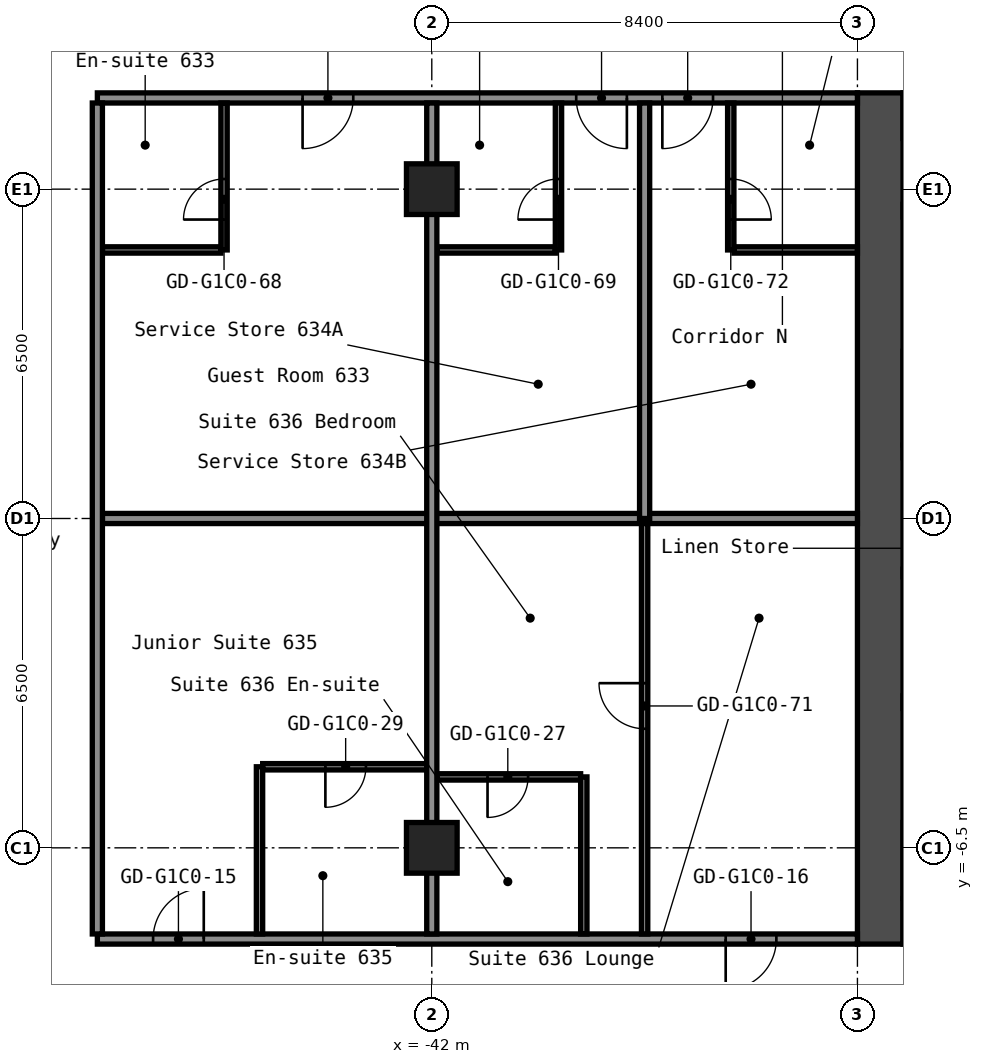
"""IFC4 building model, lengths in metres.
Left out: names, types, materials, properties, quantities, classifications, styles, units other than length and angle.
Written with IfcOpenShell. Run it as: python <this file> out.ifc"""

import sys

from ifc_helpers import new_model, si_unit, direction, frame, frame_2d, origin, origin_2d, place, context, subcontext, project, spatial, rectangle, hollow_rectangle, extrude, element, fill, save


model = new_model("IFC4")
c1 = context("Model", 3, precision=1e-05, world=origin(), true_north=direction((0.0, 1.0)))
c2 = subcontext(c1, "Body", "Model", "MODEL_VIEW")
j1 = project(units=[si_unit("LENGTHUNIT", "METRE"), si_unit("PLANEANGLEUNIT", "RADIAN")], contexts=[c1])
p1 = place(None, origin())
s1 = spatial("IfcSite", under=j1, at=p1, CompositionType="ELEMENT")
p2 = place(p1, origin())
s2 = spatial("IfcBuilding", under=s1, at=p2, CompositionType="ELEMENT")
p3 = place(p2, frame((0.0, 0.0, 26.2)))
s3 = spatial("IfcBuildingStorey", under=s2, at=p3, CompositionType="ELEMENT", Elevation=26.2)
for number, where, z_axis, x_axis in (
    (1, (-42.0, -6.5, 0.0), (0.0, 0.0, 1.0), (1.0, 0.0, 0.0)),
    (2, (-42.0, 6.5, 0.0), (0.0, 0.0, 1.0), (1.0, 0.0, 0.0)),
):
    element("IfcColumn", number, at=place(p3, frame(where, z_axis=z_axis, x_axis=x_axis)), inside=s3, PredefinedType="COLUMN", context=c2, shape_type="SweptSolid", body=[
        extrude(hollow_rectangle(XDim=1.0, YDim=1.0, WallThickness=0.04, at=origin_2d()), origin(), (0.0, 0.0, 1.0), 2.8),
    ])
p4 = place(p3, frame((-33.15, -8.4, 0.0), z_axis=(0.0, 0.0, 1.0), x_axis=(0.0, 1.0, 0.0)))
e3 = element("IfcWall", 3, at=p4, inside=s3, PredefinedType="SHEAR", context=c2, shape_type="SweptSolid", body=[
    extrude(rectangle(XDim=16.8, YDim=0.9, at=frame_2d((8.4, 0.0))), origin(), (0.0, 0.0, 1.0), 2.8),
])
p5 = place(p3, frame((-32.7, 1.325, 0.0), z_axis=(0.0, 0.0, 1.0), x_axis=(1.0, 0.0, 0.0)))
e4 = element("IfcWall", 4, at=p5, inside=s3, PredefinedType="SHEAR", context=c2, shape_type="SweptSolid", body=[
    extrude(rectangle(XDim=5.05, YDim=0.25, at=frame_2d((2.525, 0.0))), origin(), (0.0, 0.0, 1.0), 2.8),
])
p6 = place(p5, frame((3.3, 0.0, 0.0)))
e5 = element("IfcOpeningElement", 5, at=p6, cuts=e4, PredefinedType="OPENING", context=c2, shape_type="SweptSolid", body=[
    extrude(rectangle(XDim=1.2, YDim=2.1, at=frame_2d((0.6, 1.05))), frame((0.0, 0.135, 0.0), z_axis=(0.0, -1.0, 0.0), x_axis=(1.0, 0.0, 0.0)), (0.0, 0.0, 1.0), 0.27),
])
p7 = place(p3, frame((-32.7, -3.625, 0.0), z_axis=(0.0, 0.0, 1.0), x_axis=(1.0, 0.0, 0.0)))
e6 = element("IfcWall", 6, at=p7, inside=s3, PredefinedType="SHEAR", context=c2, shape_type="SweptSolid", body=[
    extrude(rectangle(XDim=4.55, YDim=0.25, at=frame_2d((2.275, 0.0))), origin(), (0.0, 0.0, 1.0), 2.8),
])
p8 = place(p7, frame((2.85, 0.0, 0.0)))
e7 = element("IfcOpeningElement", 7, at=p8, cuts=e6, PredefinedType="OPENING", context=c2, shape_type="SweptSolid", body=[
    extrude(rectangle(XDim=1.1, YDim=2.1, at=frame_2d((0.55, 1.05))), frame((0.0, 0.135, 0.0), z_axis=(0.0, -1.0, 0.0), x_axis=(1.0, 0.0, 0.0)), (0.0, 0.0, 1.0), 0.27),
])
p9 = place(p7, frame((0.6, 0.0, 0.0)))
e8 = element("IfcOpeningElement", 8, at=p9, cuts=e6, PredefinedType="OPENING", context=c2, shape_type="SweptSolid", body=[
    extrude(rectangle(XDim=1.1, YDim=2.1, at=frame_2d((0.55, 1.05))), frame((0.0, 0.135, 0.0), z_axis=(0.0, -1.0, 0.0), x_axis=(1.0, 0.0, 0.0)), (0.0, 0.0, 1.0), 0.27),
])
p10 = place(p3, frame((-32.7, -6.75, 0.0), z_axis=(0.0, 0.0, 1.0), x_axis=(1.0, 0.0, 0.0)))
e9 = element("IfcWall", 9, at=p10, inside=s3, PredefinedType="SHEAR", context=c2, shape_type="SweptSolid", body=[
    extrude(rectangle(XDim=4.55, YDim=1.5, at=frame_2d((2.275, 0.0))), origin(), (0.0, 0.0, 1.0), 2.8),
])
p11 = place(p3, frame((-32.7, -1.075, 0.0), z_axis=(0.0, 0.0, 1.0), x_axis=(1.0, 0.0, 0.0)))
e10 = element("IfcWall", 10, at=p11, inside=s3, PredefinedType="PARTITIONING", context=c2, shape_type="SweptSolid", body=[
    extrude(rectangle(XDim=1.6, YDim=0.15, at=frame_2d((0.8, 0.0))), origin(), (0.0, 0.0, 1.0), 2.8),
])
p12 = place(p3, frame((-48.6, -8.3, 0.0), z_axis=(0.0, 0.0, 1.0), x_axis=(1.0, 0.0, 0.0)))
e11 = element("IfcWall", 11, at=p12, inside=s3, PredefinedType="PARTITIONING", context=c2, shape_type="SweptSolid", body=[
    extrude(rectangle(XDim=15.0, YDim=0.2, at=frame_2d((7.5, 0.0))), origin(), (0.0, 0.0, 1.0), 2.8),
])
p13 = place(p12, frame((1.1, 0.0, 0.0)))
e12 = element("IfcOpeningElement", 12, at=p13, cuts=e11, PredefinedType="OPENING", context=c2, shape_type="SweptSolid", body=[
    extrude(rectangle(XDim=1.0, YDim=2.1, at=frame_2d((0.5, 1.05))), frame((0.0, 0.11, 0.0), z_axis=(0.0, -1.0, 0.0), x_axis=(1.0, 0.0, 0.0)), (0.0, 0.0, 1.0), 0.22),
])
p14 = place(p12, frame((12.4, 0.0, 0.0)))
e13 = element("IfcOpeningElement", 13, at=p14, cuts=e11, PredefinedType="OPENING", context=c2, shape_type="SweptSolid", body=[
    extrude(rectangle(XDim=1.0, YDim=2.1, at=frame_2d((0.5, 1.05))), frame((0.0, 0.11, 0.0), z_axis=(0.0, -1.0, 0.0), x_axis=(1.0, 0.0, 0.0)), (0.0, 0.0, 1.0), 0.22),
])
p15 = place(p3, frame((-41.9, -5.1, 0.0), z_axis=(0.0, 0.0, 1.0), x_axis=(1.0, 0.0, 0.0)))
e14 = element("IfcWall", 14, at=p15, inside=s3, PredefinedType="PARTITIONING", context=c2, shape_type="SweptSolid", body=[
    extrude(rectangle(XDim=2.837, YDim=0.125, at=frame_2d((1.419, 0.0))), origin(), (0.0, 0.0, 1.0), 2.8),
])
p16 = place(p15, frame((1.0, 0.0, 0.0)))
e15 = element("IfcOpeningElement", 15, at=p16, cuts=e14, PredefinedType="OPENING", context=c2, shape_type="SweptSolid", body=[
    extrude(rectangle(XDim=0.8, YDim=2.1, at=frame_2d((0.4, 1.05))), frame((0.0, 0.073, 0.0), z_axis=(0.0, -1.0, 0.0), x_axis=(1.0, 0.0, 0.0)), (0.0, 0.0, 1.0), 0.145),
])
p17 = place(p3, frame((-45.337, -4.9, 0.0), z_axis=(0.0, 0.0, 1.0), x_axis=(1.0, 0.0, 0.0)))
e16 = element("IfcWall", 16, at=p17, inside=s3, PredefinedType="PARTITIONING", context=c2, shape_type="SweptSolid", body=[
    extrude(rectangle(XDim=3.237, YDim=0.125, at=frame_2d((1.619, 0.0))), origin(), (0.0, 0.0, 1.0), 2.8),
])
p18 = place(p17, frame((1.238, 0.0, 0.0)))
e17 = element("IfcOpeningElement", 17, at=p18, cuts=e16, PredefinedType="OPENING", context=c2, shape_type="SweptSolid", body=[
    extrude(rectangle(XDim=0.8, YDim=2.1, at=frame_2d((0.4, 1.05))), frame((0.0, 0.073, 0.0), z_axis=(0.0, -1.0, 0.0), x_axis=(1.0, 0.0, 0.0)), (0.0, 0.0, 1.0), 0.145),
])
p19 = place(p3, frame((-48.5, 0.0, 0.0), z_axis=(0.0, 0.0, 1.0), x_axis=(1.0, 0.0, 0.0)))
e18 = element("IfcWall", 18, at=p19, inside=s3, PredefinedType="PARTITIONING", context=c2, shape_type="SweptSolid", body=[
    extrude(rectangle(XDim=14.9, YDim=0.2, at=frame_2d((7.45, 0.0))), origin(), (0.0, 0.0, 1.0), 2.8),
])
for number, where, z_axis, x_axis in (
    (19, (-48.5, 5.3, 0.0), (0.0, 0.0, 1.0), (1.0, 0.0, 0.0)),
    (20, (-41.9, 5.3, 0.0), (0.0, 0.0, 1.0), (1.0, 0.0, 0.0)),
):
    element("IfcWall", number, at=place(p3, frame(where, z_axis=z_axis, x_axis=x_axis)), inside=s3, PredefinedType="PARTITIONING", context=c2, shape_type="SweptSolid", body=[
        extrude(rectangle(XDim=2.337, YDim=0.125, at=frame_2d((1.169, 0.0))), origin(), (0.0, 0.0, 1.0), 2.8),
    ])
p20 = place(p3, frame((-36.038, 5.3, 0.0), z_axis=(0.0, 0.0, 1.0), x_axis=(1.0, 0.0, 0.0)))
e21 = element("IfcWall", 21, at=p20, inside=s3, PredefinedType="PARTITIONING", context=c2, shape_type="SweptSolid", body=[
    extrude(rectangle(XDim=2.438, YDim=0.125, at=frame_2d((1.219, 0.0))), origin(), (0.0, 0.0, 1.0), 2.8),
])
p21 = place(p3, frame((-48.6, 8.3, 0.0), z_axis=(0.0, 0.0, 1.0), x_axis=(1.0, 0.0, 0.0)))
e22 = element("IfcWall", 22, at=p21, inside=s3, PredefinedType="PARTITIONING", context=c2, shape_type="SweptSolid", body=[
    extrude(rectangle(XDim=15.0, YDim=0.2, at=frame_2d((7.5, 0.0))), origin(), (0.0, 0.0, 1.0), 2.8),
])
p22 = place(p21, frame((4.05, 0.0, 0.0)))
e23 = element("IfcOpeningElement", 23, at=p22, cuts=e22, PredefinedType="OPENING", context=c2, shape_type="SweptSolid", body=[
    extrude(rectangle(XDim=1.0, YDim=2.1, at=frame_2d((0.5, 1.05))), frame((0.0, 0.11, 0.0), z_axis=(0.0, -1.0, 0.0), x_axis=(1.0, 0.0, 0.0)), (0.0, 0.0, 1.0), 0.22),
])
p23 = place(p21, frame((9.45, 0.0, 0.0)))
e24 = element("IfcOpeningElement", 24, at=p23, cuts=e22, PredefinedType="OPENING", context=c2, shape_type="SweptSolid", body=[
    extrude(rectangle(XDim=1.0, YDim=2.1, at=frame_2d((0.5, 1.05))), frame((0.0, 0.11, 0.0), z_axis=(0.0, -1.0, 0.0), x_axis=(1.0, 0.0, 0.0)), (0.0, 0.0, 1.0), 0.22),
])
p24 = place(p21, frame((11.15, 0.0, 0.0)))
e25 = element("IfcOpeningElement", 25, at=p24, cuts=e22, PredefinedType="OPENING", context=c2, shape_type="SweptSolid", body=[
    extrude(rectangle(XDim=1.0, YDim=2.1, at=frame_2d((0.5, 1.05))), frame((0.0, 0.11, 0.0), z_axis=(0.0, -1.0, 0.0), x_axis=(1.0, 0.0, 0.0)), (0.0, 0.0, 1.0), 0.22),
])
p25 = place(p3, frame((-48.6, -8.2, 0.0), z_axis=(0.0, 0.0, 1.0), x_axis=(0.0, 1.0, 0.0)))
e26 = element("IfcWall", 26, at=p25, inside=s3, PredefinedType="PARTITIONING", context=c2, shape_type="SweptSolid", body=[
    extrude(rectangle(XDim=16.4, YDim=0.2, at=frame_2d((8.2, 0.0))), origin(), (0.0, 0.0, 1.0), 2.8),
])
p26 = place(p3, frame((-46.1, 5.3, 0.0), z_axis=(0.0, 0.0, 1.0), x_axis=(0.0, 1.0, 0.0)))
e27 = element("IfcWall", 27, at=p26, inside=s3, PredefinedType="PARTITIONING", context=c2, shape_type="SweptSolid", body=[
    extrude(rectangle(XDim=2.9, YDim=0.125, at=frame_2d((1.45, 0.0))), origin(), (0.0, 0.0, 1.0), 2.8),
])
p27 = place(p26, frame((0.6, 0.0, 0.0)))
e28 = element("IfcOpeningElement", 28, at=p27, cuts=e27, PredefinedType="OPENING", context=c2, shape_type="SweptSolid", body=[
    extrude(rectangle(XDim=0.8, YDim=2.1, at=frame_2d((0.4, 1.05))), frame((0.0, 0.073, 0.0), z_axis=(0.0, -1.0, 0.0), x_axis=(1.0, 0.0, 0.0)), (0.0, 0.0, 1.0), 0.145),
])
p28 = place(p3, frame((-45.4, -8.2, 0.0), z_axis=(0.0, 0.0, 1.0), x_axis=(0.0, 1.0, 0.0)))
e29 = element("IfcWall", 29, at=p28, inside=s3, PredefinedType="PARTITIONING", context=c2, shape_type="SweptSolid", body=[
    extrude(rectangle(XDim=3.3, YDim=0.125, at=frame_2d((1.65, 0.0))), origin(), (0.0, 0.0, 1.0), 2.8),
])
p29 = place(p3, frame((-42.0, -8.2, 0.0), z_axis=(0.0, 0.0, 1.0), x_axis=(0.0, 1.0, 0.0)))
e30 = element("IfcWall", 30, at=p29, inside=s3, PredefinedType="PARTITIONING", context=c2, shape_type="SweptSolid", body=[
    extrude(rectangle(XDim=16.4, YDim=0.2, at=frame_2d((8.2, 0.0))), origin(), (0.0, 0.0, 1.0), 2.8),
])
p30 = place(p3, frame((-39.5, 5.3, 0.0), z_axis=(0.0, 0.0, 1.0), x_axis=(0.0, 1.0, 0.0)))
e31 = element("IfcWall", 31, at=p30, inside=s3, PredefinedType="PARTITIONING", context=c2, shape_type="SweptSolid", body=[
    extrude(rectangle(XDim=2.9, YDim=0.125, at=frame_2d((1.45, 0.0))), origin(), (0.0, 0.0, 1.0), 2.8),
])
p31 = place(p30, frame((0.6, 0.0, 0.0)))
e32 = element("IfcOpeningElement", 32, at=p31, cuts=e31, PredefinedType="OPENING", context=c2, shape_type="SweptSolid", body=[
    extrude(rectangle(XDim=0.8, YDim=2.1, at=frame_2d((0.4, 1.05))), frame((0.0, 0.073, 0.0), z_axis=(0.0, -1.0, 0.0), x_axis=(1.0, 0.0, 0.0)), (0.0, 0.0, 1.0), 0.145),
])
p32 = place(p3, frame((-39.0, -8.2, 0.0), z_axis=(0.0, 0.0, 1.0), x_axis=(0.0, 1.0, 0.0)))
e33 = element("IfcWall", 33, at=p32, inside=s3, PredefinedType="PARTITIONING", context=c2, shape_type="SweptSolid", body=[
    extrude(rectangle(XDim=3.1, YDim=0.125, at=frame_2d((1.55, 0.0))), origin(), (0.0, 0.0, 1.0), 2.8),
])
p33 = place(p3, frame((-37.8, -8.2, 0.0), z_axis=(0.0, 0.0, 1.0), x_axis=(0.0, 1.0, 0.0)))
e34 = element("IfcWall", 34, at=p33, inside=s3, PredefinedType="PARTITIONING", context=c2, shape_type="SweptSolid", body=[
    extrude(rectangle(XDim=8.1, YDim=0.125, at=frame_2d((4.05, 0.0))), origin(), (0.0, 0.0, 1.0), 2.8),
])
p34 = place(p33, frame((4.05, 0.0, 0.0)))
e35 = element("IfcOpeningElement", 35, at=p34, cuts=e34, PredefinedType="OPENING", context=c2, shape_type="SweptSolid", body=[
    extrude(rectangle(XDim=0.9, YDim=2.1, at=frame_2d((0.45, 1.05))), frame((0.0, 0.073, 0.0), z_axis=(0.0, -1.0, 0.0), x_axis=(1.0, 0.0, 0.0)), (0.0, 0.0, 1.0), 0.145),
])
p35 = place(p3, frame((-37.8, 0.0, 0.0), z_axis=(0.0, 0.0, 1.0), x_axis=(0.0, 1.0, 0.0)))
e36 = element("IfcWall", 36, at=p35, inside=s3, PredefinedType="PARTITIONING", context=c2, shape_type="SweptSolid", body=[
    extrude(rectangle(XDim=8.2, YDim=0.2, at=frame_2d((4.1, 0.0))), origin(), (0.0, 0.0, 1.0), 2.8),
])
p36 = place(p3, frame((-36.1, 5.3, 0.0), z_axis=(0.0, 0.0, 1.0), x_axis=(0.0, 1.0, 0.0)))
e37 = element("IfcWall", 37, at=p36, inside=s3, PredefinedType="PARTITIONING", context=c2, shape_type="SweptSolid", body=[
    extrude(rectangle(XDim=2.9, YDim=0.125, at=frame_2d((1.45, 0.0))), origin(), (0.0, 0.0, 1.0), 2.8),
])
p37 = place(p36, frame((0.6, 0.0, 0.0)))
e38 = element("IfcOpeningElement", 38, at=p37, cuts=e37, PredefinedType="OPENING", context=c2, shape_type="SweptSolid", body=[
    extrude(rectangle(XDim=0.8, YDim=2.1, at=frame_2d((0.4, 1.05))), frame((0.0, 0.073, 0.0), z_axis=(0.0, -1.0, 0.0), x_axis=(1.0, 0.0, 0.0)), (0.0, 0.0, 1.0), 0.145),
])
p38 = place(p13, origin())
e39 = element("IfcDoor", 39, at=p38, inside=s3, OperationType="SINGLE_SWING_LEFT", PredefinedType="DOOR", context=c2, shape_type="SweptSolid", body=[
    extrude(rectangle(XDim=1.0, YDim=2.1, at=frame_2d((0.5, 1.05))), frame((0.0, 0.025, 0.0), z_axis=(0.0, -1.0, 0.0), x_axis=(1.0, 0.0, 0.0)), (0.0, 0.0, 1.0), 0.05),
])
fill(e12, e39)
p39 = place(p14, origin())
e40 = element("IfcDoor", 40, at=p39, inside=s3, OperationType="SINGLE_SWING_LEFT", PredefinedType="DOOR", context=c2, shape_type="SweptSolid", body=[
    extrude(rectangle(XDim=1.0, YDim=2.1, at=frame_2d((0.5, 1.05))), frame((0.0, 0.025, 0.0), z_axis=(0.0, -1.0, 0.0), x_axis=(1.0, 0.0, 0.0)), (0.0, 0.0, 1.0), 0.05),
])
fill(e13, e40)
p40 = place(p16, origin())
e41 = element("IfcDoor", 41, at=p40, inside=s3, OperationType="SINGLE_SWING_LEFT", PredefinedType="DOOR", context=c2, shape_type="SweptSolid", body=[
    extrude(rectangle(XDim=0.8, YDim=2.1, at=frame_2d((0.4, 1.05))), frame((0.0, 0.025, 0.0), z_axis=(0.0, -1.0, 0.0), x_axis=(1.0, 0.0, 0.0)), (0.0, 0.0, 1.0), 0.05),
])
fill(e15, e41)
p41 = place(p18, origin())
e42 = element("IfcDoor", 42, at=p41, inside=s3, OperationType="SINGLE_SWING_LEFT", PredefinedType="DOOR", context=c2, shape_type="SweptSolid", body=[
    extrude(rectangle(XDim=0.8, YDim=2.1, at=frame_2d((0.4, 1.05))), frame((0.0, 0.025, 0.0), z_axis=(0.0, -1.0, 0.0), x_axis=(1.0, 0.0, 0.0)), (0.0, 0.0, 1.0), 0.05),
])
fill(e17, e42)
p42 = place(p22, origin())
e43 = element("IfcDoor", 43, at=p42, inside=s3, OperationType="SINGLE_SWING_LEFT", PredefinedType="DOOR", context=c2, shape_type="SweptSolid", body=[
    extrude(rectangle(XDim=1.0, YDim=2.1, at=frame_2d((0.5, 1.05))), frame((0.0, 0.025, 0.0), z_axis=(0.0, -1.0, 0.0), x_axis=(1.0, 0.0, 0.0)), (0.0, 0.0, 1.0), 0.05),
])
fill(e23, e43)
p43 = place(p23, origin())
e44 = element("IfcDoor", 44, at=p43, inside=s3, OperationType="SINGLE_SWING_RIGHT", PredefinedType="DOOR", context=c2, shape_type="SweptSolid", body=[
    extrude(rectangle(XDim=1.0, YDim=2.1, at=frame_2d((0.5, 1.05))), frame((0.0, 0.025, 0.0), z_axis=(0.0, -1.0, 0.0), x_axis=(1.0, 0.0, 0.0)), (0.0, 0.0, 1.0), 0.05),
])
fill(e24, e44)
p44 = place(p24, origin())
e45 = element("IfcDoor", 45, at=p44, inside=s3, OperationType="SINGLE_SWING_LEFT", PredefinedType="DOOR", context=c2, shape_type="SweptSolid", body=[
    extrude(rectangle(XDim=1.0, YDim=2.1, at=frame_2d((0.5, 1.05))), frame((0.0, 0.025, 0.0), z_axis=(0.0, -1.0, 0.0), x_axis=(1.0, 0.0, 0.0)), (0.0, 0.0, 1.0), 0.05),
])
fill(e25, e45)
p45 = place(p27, origin())
e46 = element("IfcDoor", 46, at=p45, inside=s3, OperationType="SINGLE_SWING_RIGHT", PredefinedType="DOOR", context=c2, shape_type="SweptSolid", body=[
    extrude(rectangle(XDim=0.8, YDim=2.1, at=frame_2d((0.4, 1.05))), frame((0.0, 0.025, 0.0), z_axis=(0.0, -1.0, 0.0), x_axis=(1.0, 0.0, 0.0)), (0.0, 0.0, 1.0), 0.05),
])
fill(e28, e46)
p46 = place(p31, origin())
e47 = element("IfcDoor", 47, at=p46, inside=s3, OperationType="SINGLE_SWING_RIGHT", PredefinedType="DOOR", context=c2, shape_type="SweptSolid", body=[
    extrude(rectangle(XDim=0.8, YDim=2.1, at=frame_2d((0.4, 1.05))), frame((0.0, 0.025, 0.0), z_axis=(0.0, -1.0, 0.0), x_axis=(1.0, 0.0, 0.0)), (0.0, 0.0, 1.0), 0.05),
])
fill(e32, e47)
p47 = place(p34, origin())
e48 = element("IfcDoor", 48, at=p47, inside=s3, OperationType="SINGLE_SWING_LEFT", PredefinedType="DOOR", context=c2, shape_type="SweptSolid", body=[
    extrude(rectangle(XDim=0.9, YDim=2.1, at=frame_2d((0.45, 1.05))), frame((0.0, 0.025, 0.0), z_axis=(0.0, -1.0, 0.0), x_axis=(1.0, 0.0, 0.0)), (0.0, 0.0, 1.0), 0.05),
])
fill(e35, e48)
p48 = place(p37, origin())
e49 = element("IfcDoor", 49, at=p48, inside=s3, OperationType="SINGLE_SWING_LEFT", PredefinedType="DOOR", context=c2, shape_type="SweptSolid", body=[
    extrude(rectangle(XDim=0.8, YDim=2.1, at=frame_2d((0.4, 1.05))), frame((0.0, 0.025, 0.0), z_axis=(0.0, -1.0, 0.0), x_axis=(1.0, 0.0, 0.0)), (0.0, 0.0, 1.0), 0.05),
])
fill(e38, e49)
save(model, sys.argv[1])
